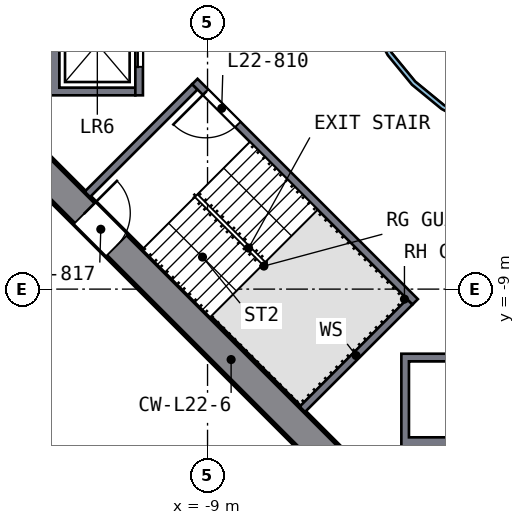
"""IFC4 building model, lengths in metres.
Left out: names, types, materials, properties, quantities, classifications, styles, units other than length and angle.
Written with IfcOpenShell. Run it as: python <this file> out.ifc"""

import sys

from ifc_helpers import new_model, si_unit, direction, frame, frame_2d, origin, place, context, subcontext, project, spatial, polyline, rectangle, outline, extrude, element, fill, save


model = new_model("IFC4")
c1 = context("Model", 3, precision=1e-05, world=origin(), true_north=direction((0.0, 1.0)))
c2 = subcontext(c1, "Body", "Model", "MODEL_VIEW")
j1 = project(units=[si_unit("LENGTHUNIT", "METRE"), si_unit("PLANEANGLEUNIT", "RADIAN")], contexts=[c1])
p1 = place(None, origin())
s1 = spatial("IfcSite", under=j1, at=p1, CompositionType="ELEMENT")
p2 = place(p1, origin())
s2 = spatial("IfcBuilding", under=s1, at=p2, CompositionType="ELEMENT")
p3 = place(p2, frame((0.0, 0.0, 96.5)))
s3 = spatial("IfcBuildingStorey", under=s2, at=p3, CompositionType="ELEMENT", Elevation=96.5)
p4 = place(p3, frame((-13.717, -5.516, 0.0), z_axis=(0.0, 0.0, 1.0), x_axis=(0.707106781, -0.707106781, 0.0)))
e1 = element("IfcWall", 1, at=p4, inside=s3, PredefinedType="SHEAR", context=c2, shape_type="SweptSolid", body=[
    extrude(rectangle(XDim=11.598, YDim=0.8, at=frame_2d((5.799, 0.0))), origin(), (0.0, 0.0, 1.0), 3.5),
])
p5 = place(p4, frame((2.099, 0.0, 0.0)))
e2 = element("IfcOpeningElement", 2, at=p5, cuts=e1, PredefinedType="OPENING", context=c2, shape_type="SweptSolid", body=[
    extrude(rectangle(XDim=1.2, YDim=2.1, at=frame_2d((0.6, 1.05))), frame((0.0, 0.41, 0.0), z_axis=(0.0, -1.0, 0.0), x_axis=(1.0, 0.0, 0.0)), (0.0, 0.0, 1.0), 0.82),
])
p6 = place(p3, origin())
e3 = element("IfcWall", 3, at=p6, inside=s3, PredefinedType="SOLIDWALL", context=c2, shape_type="SweptSolid", body=[
    extrude(outline(polyline([(-13.2, -3.9), (-13.2, -1.2), (-10.9, -1.2), (-10.9, -1.4), (-12.9, -1.4), (-12.9, -3.7), (-10.9, -3.7), (-10.9, -3.9), (-13.2, -3.9)])), origin(), (0.0, 0.0, 1.0), 3.19),
])
p7 = place(p3, frame((-10.8, -1.2, 0.0), z_axis=(0.0, 0.0, 1.0), x_axis=(0.0, -1.0, 0.0)))
e4 = element("IfcWall", 4, at=p7, inside=s3, PredefinedType="SOLIDWALL", context=c2, shape_type="SweptSolid", body=[
    extrude(rectangle(XDim=2.7, YDim=0.2, at=frame_2d((1.35, 0.0))), origin(), (0.0, 0.0, 1.0), 3.19),
])
p8 = place(p7, frame((0.75, 0.0, 0.0)))
e5 = element("IfcOpeningElement", 5, at=p8, cuts=e4, PredefinedType="OPENING", context=c2, shape_type="SweptSolid", body=[
    extrude(rectangle(XDim=1.2, YDim=2.1, at=frame_2d((0.6, 1.05))), frame((0.0, 0.11, 0.0), z_axis=(0.0, -1.0, 0.0), x_axis=(1.0, 0.0, 0.0)), (0.0, 0.0, 1.0), 0.22),
])
p9 = place(p3, origin())
e6 = element("IfcWall", 6, at=p9, inside=s3, PredefinedType="SOLIDWALL", context=c2, shape_type="SweptSolid", body=[
    extrude(outline(polyline([(-1.2, -13.2), (-3.9, -13.2), (-3.9, -10.7), (-1.2, -10.7), (-1.2, -13.2)]), holes=[polyline([(-3.7, -10.9), (-3.7, -12.9), (-1.4, -12.9), (-1.4, -10.9), (-3.7, -10.9)])]), origin(), (0.0, 0.0, 1.0), 3.19),
])
p10 = place(p3, frame((-3.535, -9.334, 0.0), z_axis=(0.0, 0.0, 1.0), x_axis=(-0.707106781, 0.707106781, 0.0)))
e7 = element("IfcWall", 7, at=p10, inside=s3, PredefinedType="SOLIDWALL", context=c2, shape_type="SweptSolid", body=[
    extrude(rectangle(XDim=8.2, YDim=0.2, at=frame_2d((4.1, 0.0))), origin(), (0.0, 0.0, 1.0), 3.19),
])
p11 = place(p10, frame((6.6, 0.0, 0.0)))
e8 = element("IfcOpeningElement", 8, at=p11, cuts=e7, PredefinedType="OPENING", context=c2, shape_type="SweptSolid", body=[
    extrude(rectangle(XDim=1.2, YDim=2.1, at=frame_2d((0.6, 1.05))), frame((0.0, 0.11, 0.0), z_axis=(0.0, -1.0, 0.0), x_axis=(1.0, 0.0, 0.0)), (0.0, 0.0, 1.0), 0.22),
])
for number, where, z_axis, x_axis in (
    (9, (-9.334, -3.677, 0.0), (0.0, 0.0, 1.0), (-0.707, -0.707, 0.0)),
    (10, (-3.677, -9.334, 0.0), (0.0, 0.0, 1.0), (-0.707, -0.707, 0.0)),
):
    element("IfcWall", number, at=place(p3, frame(where, z_axis=z_axis, x_axis=x_axis)), inside=s3, PredefinedType="SOLIDWALL", context=c2, shape_type="SweptSolid", body=[
        extrude(rectangle(XDim=4.0, YDim=0.2, at=frame_2d((2.0, 0.0))), origin(), (0.0, 0.0, 1.0), 3.19),
    ])
p12 = place(p3, origin())
e11 = element("IfcWall", 11, at=p12, inside=s3, PredefinedType="SOLIDWALL", context=c2, shape_type="SweptSolid", body=[
    extrude(outline(polyline([(5.021, -0.999), (4.73, -1.959), (4.257, -2.844), (3.62, -3.62), (2.844, -4.257), (1.959, -4.73), (0.999, -5.021), (0.0, -5.12), (-0.999, -5.021), (-1.959, -4.73), (-2.844, -4.257), (-3.62, -3.62), (-4.257, -2.844), (-4.73, -1.959), (-5.021, -0.999), (-5.12, 0.0), (-5.021, 0.999), (-4.73, 1.959), (-4.257, 2.844), (-3.62, 3.62), (-2.844, 4.257), (-1.959, 4.73), (-0.999, 5.021), (0.0, 5.12), (0.999, 5.021), (1.959, 4.73), (2.844, 4.257), (3.62, 3.62), (4.257, 2.844), (4.73, 1.959), (5.021, 0.999), (5.12, 0.0), (5.021, -0.999)]), holes=[polyline([(4.904, 0.976), (4.619, 1.913), (4.157, 2.778), (3.535, 3.535), (2.778, 4.157), (1.913, 4.619), (0.976, 4.904), (0.0, 5.0), (-0.976, 4.904), (-1.913, 4.619), (-2.778, 4.157), (-3.535, 3.535), (-4.157, 2.778), (-4.619, 1.913), (-4.904, 0.976), (-5.0, 0.0), (-4.904, -0.976), (-4.619, -1.913), (-4.157, -2.778), (-3.535, -3.535), (-2.778, -4.157), (-1.913, -4.619), (-0.976, -4.904), (0.0, -5.0), (0.976, -4.904), (1.913, -4.619), (2.778, -4.157), (3.535, -3.535), (4.157, -2.778), (4.619, -1.913), (4.904, -0.976), (5.0, 0.0), (4.904, 0.976)])]), origin(), (0.0, 0.0, 1.0), 3.19),
])
p13 = place(p8, origin())
e12 = element("IfcDoor", 12, at=p13, inside=s3, OperationType="DOUBLE_DOOR_SLIDING", PredefinedType="DOOR", context=c2, shape_type="SweptSolid", body=[
    extrude(rectangle(XDim=1.2, YDim=2.1, at=frame_2d((0.6, 1.05))), frame((0.0, 0.025, 0.0), z_axis=(0.0, -1.0, 0.0), x_axis=(1.0, 0.0, 0.0)), (0.0, 0.0, 1.0), 0.05),
])
fill(e5, e12)
p14 = place(p11, origin())
e13 = element("IfcDoor", 13, at=p14, inside=s3, OperationType="SINGLE_SWING_RIGHT", PredefinedType="DOOR", context=c2, shape_type="SweptSolid", body=[
    extrude(rectangle(XDim=1.2, YDim=2.1, at=frame_2d((0.6, 1.05))), frame((0.0, 0.025, 0.0), z_axis=(0.0, -1.0, 0.0), x_axis=(1.0, 0.0, 0.0)), (0.0, 0.0, 1.0), 0.05),
])
fill(e8, e13)
p15 = place(p5, origin())
e14 = element("IfcDoor", 14, at=p15, inside=s3, OperationType="SINGLE_SWING_LEFT", PredefinedType="DOOR", context=c2, shape_type="SweptSolid", body=[
    extrude(rectangle(XDim=1.2, YDim=2.1, at=frame_2d((0.6, 1.05))), frame((0.0, 0.025, 0.0), z_axis=(0.0, -1.0, 0.0), x_axis=(1.0, 0.0, 0.0)), (0.0, 0.0, 1.0), 0.05),
])
fill(e2, e14)
save(model, sys.argv[1])
